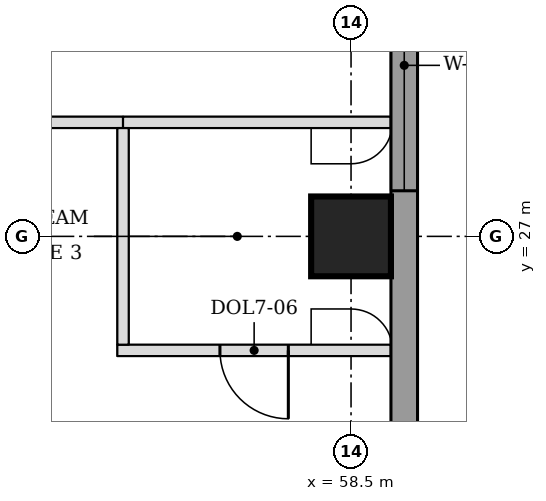
"""IFC4 building model, lengths in metres.
Left out: names, types, materials, properties, quantities, classifications, styles, units other than length and angle.
Written with IfcOpenShell. Run it as: python <this file> out.ifc"""

import sys

from ifc_helpers import new_model, si_unit, direction, frame, frame_2d, origin, origin_2d, place, context, subcontext, project, spatial, rectangle, extrude, element, fill, save


model = new_model("IFC4")
c1 = context("Model", 3, precision=1e-05, world=origin(), true_north=direction((0.0, 1.0)))
c2 = subcontext(c1, "Body", "Model", "MODEL_VIEW")
j1 = project(units=[si_unit("LENGTHUNIT", "METRE"), si_unit("PLANEANGLEUNIT", "RADIAN")], contexts=[c1])
p1 = place(None, origin())
s1 = spatial("IfcSite", under=j1, at=p1, CompositionType="ELEMENT")
p2 = place(p1, origin())
s2 = spatial("IfcBuilding", under=s1, at=p2, CompositionType="ELEMENT")
p3 = place(p2, frame((0.0, 0.0, 130.7)))
s3 = spatial("IfcBuildingStorey", under=s2, at=p3, CompositionType="ELEMENT", Elevation=130.7)
p4 = place(p3, frame((58.5, 27.0, 0.0), z_axis=(0.0, 0.0, 1.0), x_axis=(1.0, 0.0, 0.0)))
e1 = element("IfcColumn", 1, at=p4, inside=s3, PredefinedType="COLUMN", context=c2, shape_type="SweptSolid", body=[
    extrude(rectangle(XDim=1.05, YDim=1.05, at=origin_2d()), origin(), (0.0, 0.0, 1.0), 3.7),
])
p5 = place(p3, frame((59.2, 22.138, 0.0), z_axis=(0.0, 0.0, 1.0), x_axis=(0.0, 1.0, 0.0)))
e2 = element("IfcWall", 2, at=p5, inside=s3, PredefinedType="STANDARD", context=c2, shape_type="SweptSolid", body=[
    extrude(rectangle(XDim=17.837, YDim=0.35, at=frame_2d((8.919, 0.0))), origin(), (0.0, 0.0, 1.0), 3.525),
])
p6 = place(p5, frame((5.462, 0.0, 0.9)))
e3 = element("IfcOpeningElement", 3, at=p6, cuts=e2, PredefinedType="OPENING", context=c2, shape_type="SweptSolid", body=[
    extrude(rectangle(XDim=3.3, YDim=1.9, at=frame_2d((1.65, 0.95))), frame((0.0, 0.185, 0.0), z_axis=(0.0, -1.0, 0.0), x_axis=(1.0, 0.0, 0.0)), (0.0, 0.0, 1.0), 0.37),
])
p7 = place(p5, frame((14.037, 0.0, 0.9)))
e4 = element("IfcOpeningElement", 4, at=p7, cuts=e2, PredefinedType="OPENING", context=c2, shape_type="SweptSolid", body=[
    extrude(rectangle(XDim=3.3, YDim=1.9, at=frame_2d((1.65, 0.95))), frame((0.0, 0.185, 0.0), z_axis=(0.0, -1.0, 0.0), x_axis=(1.0, 0.0, 0.0)), (0.0, 0.0, 1.0), 0.37),
])
p8 = place(p3, frame((55.425, 25.5, 0.0), z_axis=(0.0, 0.0, 1.0), x_axis=(1.0, 0.0, 0.0)))
e5 = element("IfcWall", 5, at=p8, inside=s3, PredefinedType="PARTITIONING", context=c2, shape_type="SweptSolid", body=[
    extrude(rectangle(XDim=3.6, YDim=0.15, at=frame_2d((1.8, 0.0))), origin(), (0.0, 0.0, 1.0), 3.55),
])
p9 = place(p8, frame((1.35, 0.0, 0.0)))
e6 = element("IfcOpeningElement", 6, at=p9, cuts=e5, PredefinedType="OPENING", context=c2, shape_type="SweptSolid", body=[
    extrude(rectangle(XDim=0.9, YDim=2.1, at=frame_2d((0.45, 1.05))), frame((0.0, 0.085, 0.0), z_axis=(0.0, -1.0, 0.0), x_axis=(1.0, 0.0, 0.0)), (0.0, 0.0, 1.0), 0.17),
])
p10 = place(p3, frame((49.5, 28.5, 0.0), z_axis=(0.0, 0.0, 1.0), x_axis=(1.0, 0.0, 0.0)))
e7 = element("IfcWall", 7, at=p10, inside=s3, PredefinedType="PARTITIONING", context=c2, shape_type="SweptSolid", body=[
    extrude(rectangle(XDim=6.0, YDim=0.15, at=frame_2d((3.0, 0.0))), origin(), (0.0, 0.0, 1.0), 3.55),
])
p11 = place(p3, frame((55.5, 28.5, 0.0), z_axis=(0.0, 0.0, 1.0), x_axis=(1.0, 0.0, 0.0)))
e8 = element("IfcWall", 8, at=p11, inside=s3, PredefinedType="PARTITIONING", context=c2, shape_type="SweptSolid", body=[
    extrude(rectangle(XDim=3.525, YDim=0.15, at=frame_2d((1.762, 0.0))), origin(), (0.0, 0.0, 1.0), 3.55),
])
p12 = place(p3, frame((55.5, 25.575, 0.0), z_axis=(0.0, 0.0, 1.0), x_axis=(0.0, 1.0, 0.0)))
e9 = element("IfcWall", 9, at=p12, inside=s3, PredefinedType="PARTITIONING", context=c2, shape_type="SweptSolid", body=[
    extrude(rectangle(XDim=2.85, YDim=0.15, at=frame_2d((1.425, 0.0))), origin(), (0.0, 0.0, 1.0), 3.55),
])
p13 = place(p6, origin())
e10 = element("IfcWindow", 10, at=p13, inside=s3, PartitioningType="SINGLE_PANEL", PredefinedType="WINDOW", context=c2, shape_type="SweptSolid", body=[
    extrude(rectangle(XDim=3.3, YDim=1.9, at=frame_2d((1.65, 0.95))), frame((0.0, 0.085, 0.0), z_axis=(0.0, -1.0, 0.0), x_axis=(1.0, 0.0, 0.0)), (0.0, 0.0, 1.0), 0.06),
])
fill(e3, e10)
p14 = place(p9, frame((0.9, 0.0, 0.0), z_axis=(0.0, 0.0, 1.0), x_axis=(-1.0, 0.0, 0.0)))
e11 = element("IfcDoor", 11, at=p14, inside=s3, OperationType="SINGLE_SWING_LEFT", PredefinedType="DOOR", context=c2, shape_type="SweptSolid", body=[
    extrude(rectangle(XDim=0.9, YDim=2.1, at=frame_2d((0.45, 1.05))), frame((0.0, 0.025, 0.0), z_axis=(0.0, -1.0, 0.0), x_axis=(1.0, 0.0, 0.0)), (0.0, 0.0, 1.0), 0.05),
])
fill(e6, e11)
save(model, sys.argv[1])
